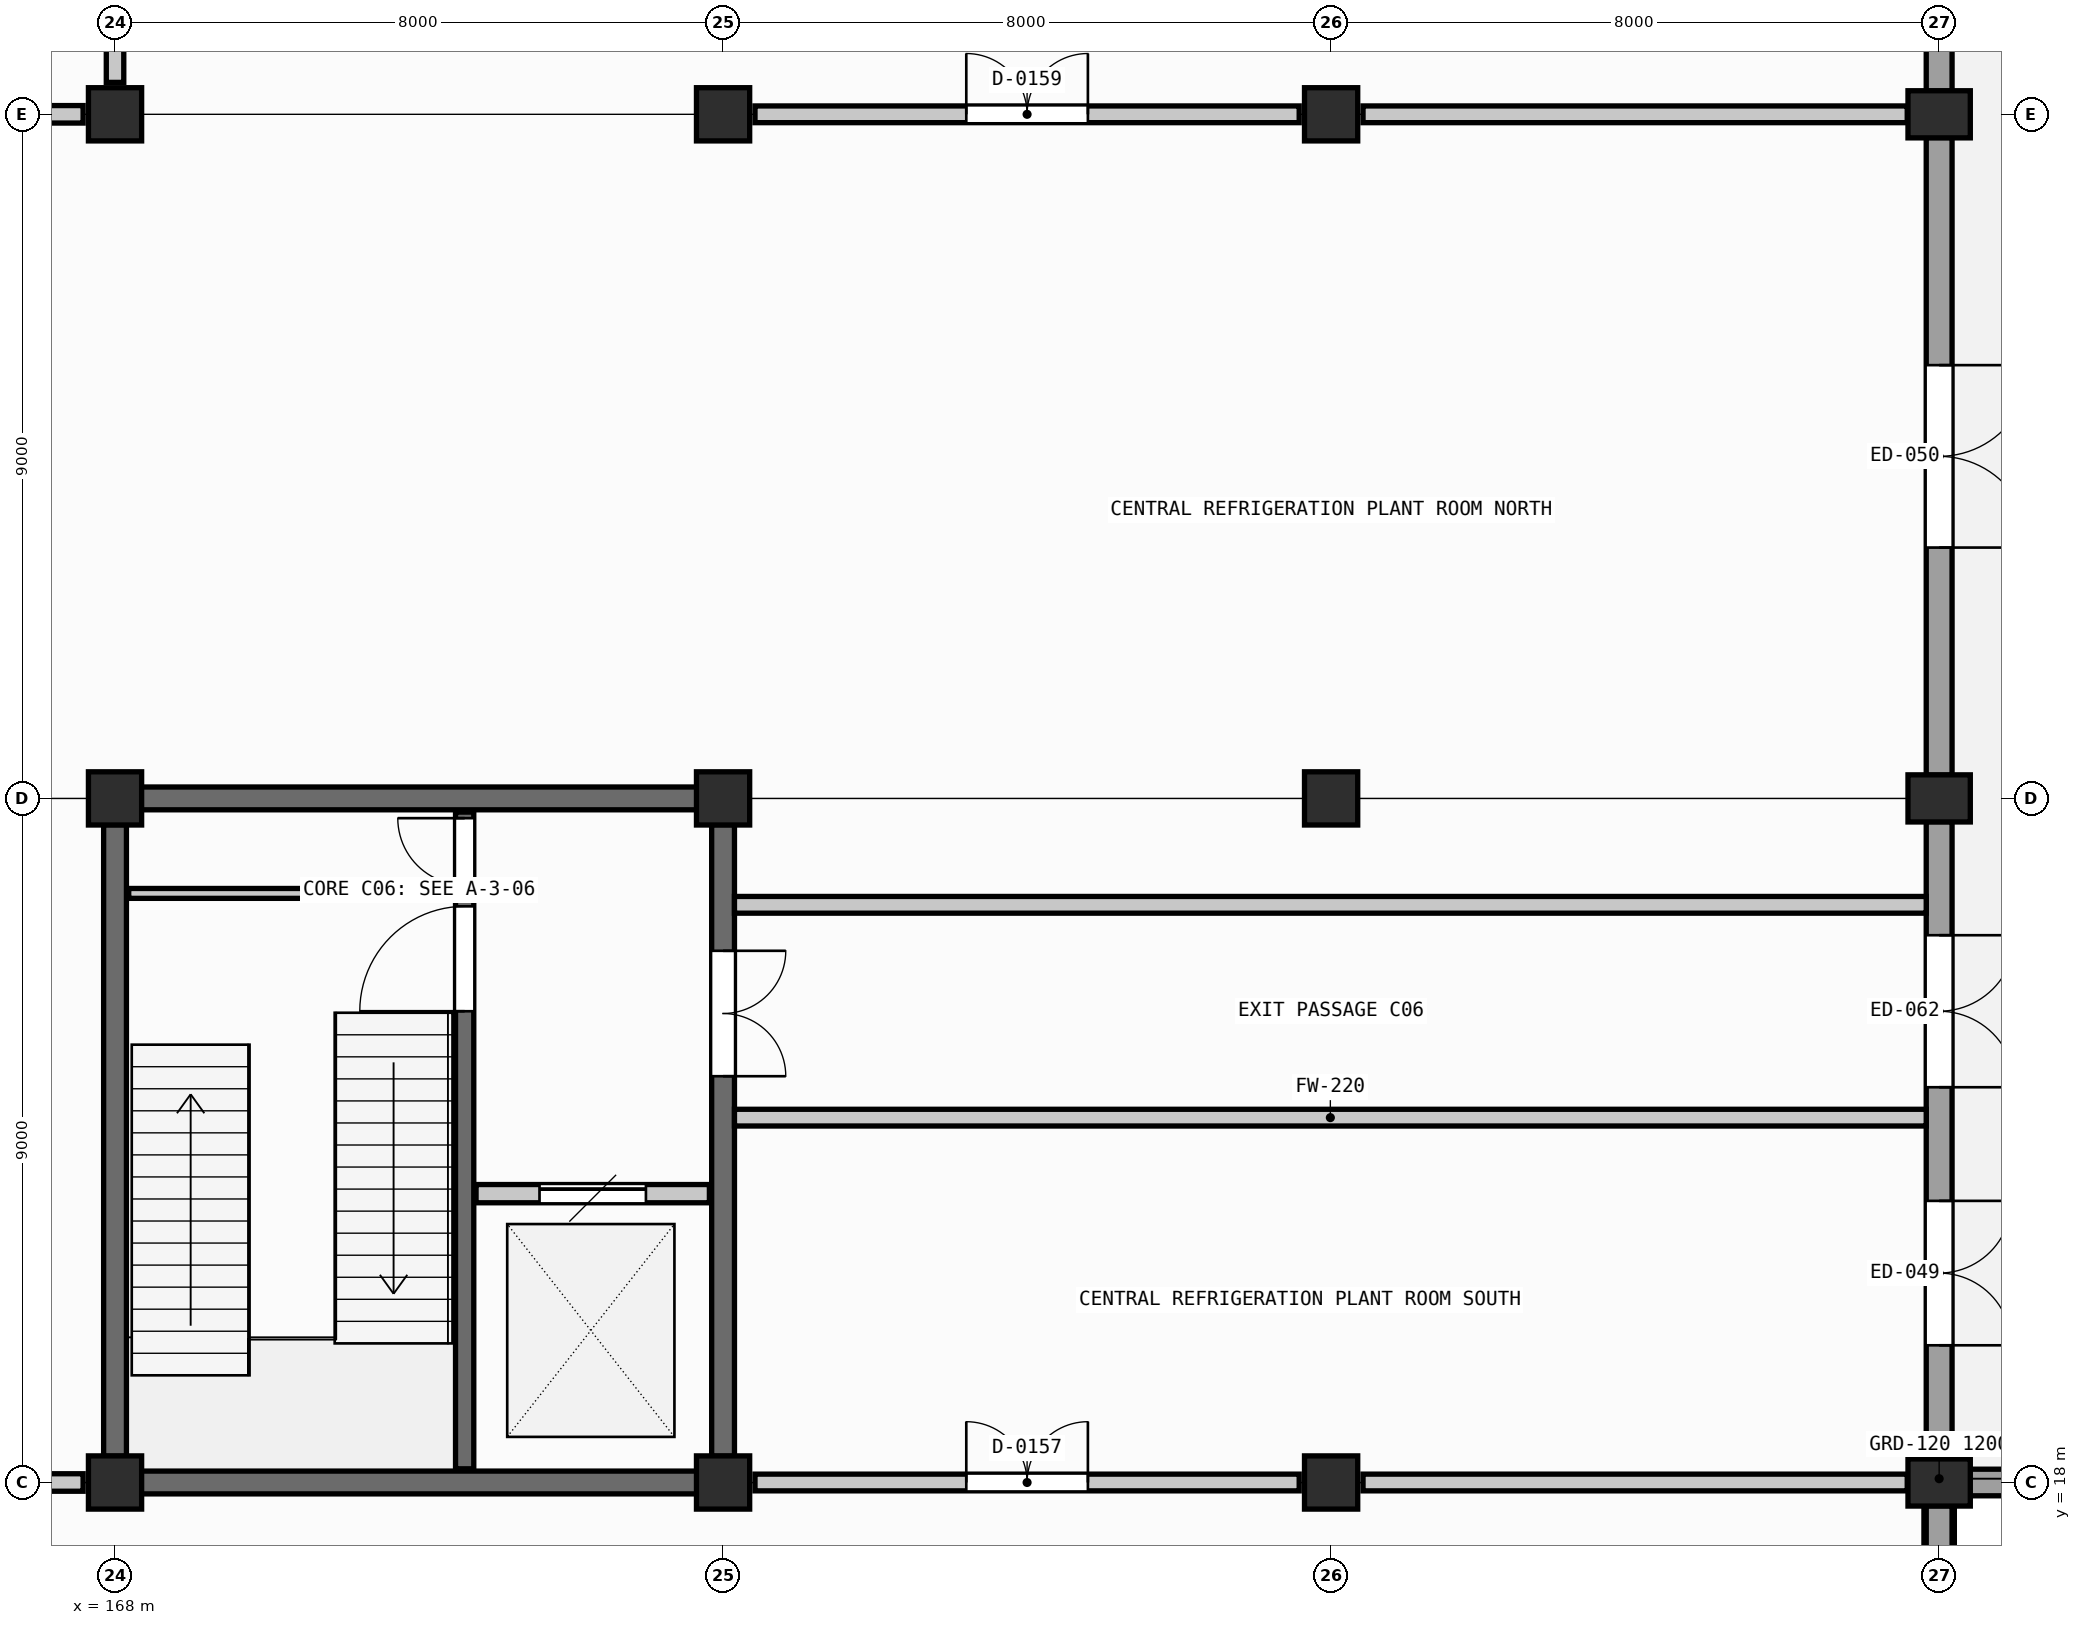
"""IFC4 building model, lengths in metres.
Left out: names, types, materials, properties, quantities, classifications, styles, units other than length and angle.
Written with IfcOpenShell. Run it as: python <this file> out.ifc"""

import sys

from ifc_helpers import new_model, si_unit, direction, frame, frame_2d, origin, origin_2d, place, context, subcontext, project, spatial, rectangle, extrude, element, fill, save


model = new_model("IFC4")
c1 = context("Model", 3, precision=1e-05, world=origin(), true_north=direction((0.0, 1.0)))
c2 = subcontext(c1, "Body", "Model", "MODEL_VIEW")
j1 = project(units=[si_unit("LENGTHUNIT", "METRE"), si_unit("PLANEANGLEUNIT", "RADIAN")], contexts=[c1])
p1 = place(None, origin())
s1 = spatial("IfcSite", under=j1, at=p1, CompositionType="ELEMENT")
p2 = place(p1, origin())
s2 = spatial("IfcBuilding", under=s1, at=p2, CompositionType="ELEMENT")
p3 = place(p2, origin())
s3 = spatial("IfcBuildingStorey", under=s2, at=p3, CompositionType="ELEMENT", Elevation=0.0)
p4 = place(p3, frame((192.0, 18.0, -1.25), z_axis=(0.0, 0.0, 1.0), x_axis=(1.0, 0.0, 0.0)))
e1 = element("IfcWall", 1, at=p4, inside=s3, PredefinedType="STANDARD", context=c2, shape_type="SweptSolid", body=[
    extrude(rectangle(XDim=3.2, YDim=0.35, at=frame_2d((1.6, 0.0))), origin(), (0.0, 0.0, 1.0), 0.97),
])
p5 = place(p3, frame((192.0, 0.0, -1.25), z_axis=(0.0, 0.0, 1.0), x_axis=(0.0, 1.0, 0.0)))
e2 = element("IfcWall", 2, at=p5, inside=s3, PredefinedType="STANDARD", context=c2, shape_type="SweptSolid", body=[
    extrude(rectangle(XDim=18.0, YDim=0.4, at=frame_2d((9.0, 0.0))), origin(), (0.0, 0.0, 1.0), 0.9),
])
for number, where, z_axis, x_axis in (
    (3, (168.0, 18.0, -1.25), (0.0, 0.0, 1.0), (1.0, 0.0, 0.0)),
    (4, (168.0, 27.0, -1.25), (0.0, 0.0, 1.0), (1.0, 0.0, 0.0)),
    (5, (168.0, 36.0, -1.25), (0.0, 0.0, 1.0), (1.0, 0.0, 0.0)),
    (6, (176.0, 18.0, -1.25), (0.0, 0.0, 1.0), (1.0, 0.0, 0.0)),
    (7, (176.0, 27.0, -1.25), (0.0, 0.0, 1.0), (1.0, 0.0, 0.0)),
    (8, (176.0, 36.0, -1.25), (0.0, 0.0, 1.0), (1.0, 0.0, 0.0)),
    (9, (184.0, 18.0, -1.25), (0.0, 0.0, 1.0), (1.0, 0.0, 0.0)),
    (10, (184.0, 27.0, -1.25), (0.0, 0.0, 1.0), (1.0, 0.0, 0.0)),
    (11, (184.0, 36.0, -1.25), (0.0, 0.0, 1.0), (1.0, 0.0, 0.0)),
):
    element("IfcColumn", number, at=place(p3, frame(where, z_axis=z_axis, x_axis=x_axis)), inside=s3, PredefinedType="COLUMN", context=c2, shape_type="SweptSolid", body=[
        extrude(rectangle(XDim=0.7, YDim=0.7, at=origin_2d()), origin(), (0.0, 0.0, 1.0), 6.05),
    ])
for number, where, z_axis, x_axis in (
    (12, (192.0, 18.0, -1.25), (0.0, 0.0, 1.0), (1.0, 0.0, 0.0)),
    (13, (192.0, 27.0, -1.25), (0.0, 0.0, 1.0), (1.0, 0.0, 0.0)),
    (14, (192.0, 36.0, -1.25), (0.0, 0.0, 1.0), (1.0, 0.0, 0.0)),
):
    element("IfcColumn", number, at=place(p3, frame(where, z_axis=z_axis, x_axis=x_axis)), inside=s3, PredefinedType="COLUMN", context=c2, shape_type="SweptSolid", body=[
        extrude(rectangle(XDim=0.82, YDim=0.62, at=origin_2d()), origin(), (0.0, 0.0, 1.0), 6.05),
    ])
p6 = place(p3, frame((192.0, 9.305, 0.0), z_axis=(0.0, 0.0, 1.0), x_axis=(0.0, 1.0, 0.0)))
e15 = element("IfcWall", 15, at=p6, inside=s3, PredefinedType="SOLIDWALL", context=c2, shape_type="SweptSolid", body=[
    extrude(rectangle(XDim=8.39, YDim=0.34, at=frame_2d((4.195, 0.0))), origin(), (0.0, 0.0, 1.0), 3.65),
])
p7 = place(p3, frame((192.0, 18.305, 0.0), z_axis=(0.0, 0.0, 1.0), x_axis=(0.0, 1.0, 0.0)))
e16 = element("IfcWall", 16, at=p7, inside=s3, PredefinedType="SOLIDWALL", context=c2, shape_type="SweptSolid", body=[
    extrude(rectangle(XDim=8.39, YDim=0.34, at=frame_2d((4.195, 0.0))), origin(), (0.0, 0.0, 1.0), 3.65),
])
p8 = place(p7, frame((1.5, 0.0, 0.0)))
e17 = element("IfcOpeningElement", 17, at=p8, cuts=e16, PredefinedType="OPENING", context=c2, shape_type="SweptSolid", body=[
    extrude(rectangle(XDim=1.9, YDim=2.3, at=frame_2d((0.95, 1.15))), frame((0.0, 0.18, 0.0), z_axis=(0.0, -1.0, 0.0), x_axis=(1.0, 0.0, 0.0)), (0.0, 0.0, 1.0), 0.36),
])
p9 = place(p7, frame((4.895, 0.0, 0.0)))
e18 = element("IfcOpeningElement", 18, at=p9, cuts=e16, PredefinedType="OPENING", context=c2, shape_type="SweptSolid", body=[
    extrude(rectangle(XDim=2.0, YDim=2.25, at=frame_2d((1.0, 1.125))), frame((0.0, 0.18, 0.0), z_axis=(0.0, -1.0, 0.0), x_axis=(1.0, 0.0, 0.0)), (0.0, 0.0, 1.0), 0.36),
])
p10 = place(p3, frame((192.0, 27.305, 0.0), z_axis=(0.0, 0.0, 1.0), x_axis=(0.0, 1.0, 0.0)))
e19 = element("IfcWall", 19, at=p10, inside=s3, PredefinedType="SOLIDWALL", context=c2, shape_type="SweptSolid", body=[
    extrude(rectangle(XDim=8.39, YDim=0.34, at=frame_2d((4.195, 0.0))), origin(), (0.0, 0.0, 1.0), 3.65),
])
p11 = place(p10, frame((2.995, 0.0, 0.0)))
e20 = element("IfcOpeningElement", 20, at=p11, cuts=e19, PredefinedType="OPENING", context=c2, shape_type="SweptSolid", body=[
    extrude(rectangle(XDim=2.4, YDim=2.3, at=frame_2d((1.2, 1.15))), frame((0.0, 0.18, 0.0), z_axis=(0.0, -1.0, 0.0), x_axis=(1.0, 0.0, 0.0)), (0.0, 0.0, 1.0), 0.36),
])
p12 = place(p3, frame((192.0, 36.305, 0.0), z_axis=(0.0, 0.0, 1.0), x_axis=(0.0, 1.0, 0.0)))
e21 = element("IfcWall", 21, at=p12, inside=s3, PredefinedType="SOLIDWALL", context=c2, shape_type="SweptSolid", body=[
    extrude(rectangle(XDim=8.39, YDim=0.34, at=frame_2d((4.195, 0.0))), origin(), (0.0, 0.0, 1.0), 3.65),
])
p13 = place(p12, frame((2.395, 0.0, 1.0)))
e22 = element("IfcOpeningElement", 22, at=p13, cuts=e21, PredefinedType="OPENING", context=c2, shape_type="SweptSolid", body=[
    extrude(rectangle(XDim=3.6, YDim=1.7, at=frame_2d((1.8, 0.85))), frame((0.0, 0.18, 0.0), z_axis=(0.0, -1.0, 0.0), x_axis=(1.0, 0.0, 0.0)), (0.0, 0.0, 1.0), 0.36),
])
for number, where, z_axis, x_axis in (
    (23, (168.345, 18.0, -1.25), (0.0, 0.0, 1.0), (1.0, 0.0, 0.0)),
    (24, (168.345, 27.0, -1.25), (0.0, 0.0, 1.0), (1.0, 0.0, 0.0)),
):
    element("IfcWall", number, at=place(p3, frame(where, z_axis=z_axis, x_axis=x_axis)), inside=s3, PredefinedType="SHEAR", context=c2, shape_type="SweptSolid", body=[
        extrude(rectangle(XDim=7.31, YDim=0.3, at=frame_2d((3.655, 0.0))), origin(), (0.0, 0.0, 1.0), 5.755),
    ])
p14 = place(p3, frame((168.0, 18.345, -1.25), z_axis=(0.0, 0.0, 1.0), x_axis=(0.0, 1.0, 0.0)))
e25 = element("IfcWall", 25, at=p14, inside=s3, PredefinedType="SHEAR", context=c2, shape_type="SweptSolid", body=[
    extrude(rectangle(XDim=8.31, YDim=0.3, at=frame_2d((4.155, 0.0))), origin(), (0.0, 0.0, 1.0), 5.755),
])
p15 = place(p3, frame((176.0, 18.345, -1.25), z_axis=(0.0, 0.0, 1.0), x_axis=(0.0, 1.0, 0.0)))
e26 = element("IfcWall", 26, at=p15, inside=s3, PredefinedType="SHEAR", context=c2, shape_type="SweptSolid", body=[
    extrude(rectangle(XDim=8.31, YDim=0.3, at=frame_2d((4.155, 0.0))), origin(), (0.0, 0.0, 1.0), 5.755),
])
p16 = place(p15, frame((5.0, 0.0, 1.25)))
e27 = element("IfcOpeningElement", 27, at=p16, cuts=e26, PredefinedType="OPENING", context=c2, shape_type="SweptSolid", body=[
    extrude(rectangle(XDim=1.65, YDim=2.22, at=frame_2d((0.825, 1.11))), frame((0.0, 0.16, 0.0), z_axis=(0.0, -1.0, 0.0), x_axis=(1.0, 0.0, 0.0)), (0.0, 0.0, 1.0), 0.32),
])
p17 = place(p3, frame((172.6, 18.18, -1.25), z_axis=(0.0, 0.0, 1.0), x_axis=(0.0, 1.0, 0.0)))
e28 = element("IfcWall", 28, at=p17, inside=s3, PredefinedType="SHEAR", context=c2, shape_type="SweptSolid", body=[
    extrude(rectangle(XDim=8.64, YDim=0.24, at=frame_2d((4.32, 0.0))), origin(), (0.0, 0.0, 1.0), 5.755),
])
p18 = place(p17, frame((6.02, 0.0, 1.25)))
e29 = element("IfcOpeningElement", 29, at=p18, cuts=e28, PredefinedType="OPENING", context=c2, shape_type="SweptSolid", body=[
    extrude(rectangle(XDim=1.38, YDim=2.22, at=frame_2d((0.69, 1.11))), frame((0.0, 0.13, 0.0), z_axis=(0.0, -1.0, 0.0), x_axis=(1.0, 0.0, 0.0)), (0.0, 0.0, 1.0), 0.26),
])
p19 = place(p17, frame((7.68, 0.0, 1.25)))
e30 = element("IfcOpeningElement", 30, at=p19, cuts=e28, PredefinedType="OPENING", context=c2, shape_type="SweptSolid", body=[
    extrude(rectangle(XDim=0.88, YDim=2.02, at=frame_2d((0.44, 1.01))), frame((0.0, 0.13, 0.0), z_axis=(0.0, -1.0, 0.0), x_axis=(1.0, 0.0, 0.0)), (0.0, 0.0, 1.0), 0.26),
])
p20 = place(p3, frame((168.18, 25.75, 0.0), z_axis=(0.0, 0.0, 1.0), x_axis=(1.0, 0.0, 0.0)))
e31 = element("IfcWall", 31, at=p20, inside=s3, PredefinedType="PARTITIONING", context=c2, shape_type="SweptSolid", body=[
    extrude(rectangle(XDim=4.28, YDim=0.13, at=frame_2d((2.14, 0.0))), origin(), (0.0, 0.0, 1.0), 3.855),
])
p21 = place(p3, frame((172.75, 21.8, 0.0), z_axis=(0.0, 0.0, 1.0), x_axis=(1.0, 0.0, 0.0)))
e32 = element("IfcWall", 32, at=p21, inside=s3, PredefinedType="SHEAR", context=c2, shape_type="SweptSolid", body=[
    extrude(rectangle(XDim=3.07, YDim=0.24, at=frame_2d((1.535, 0.0))), origin(), (0.0, 0.0, 1.0), 3.855),
])
p22 = place(p21, frame((0.835, 0.0, 0.0)))
e33 = element("IfcOpeningElement", 33, at=p22, cuts=e32, PredefinedType="OPENING", context=c2, shape_type="SweptSolid", body=[
    extrude(rectangle(XDim=1.4, YDim=2.3, at=frame_2d((0.7, 1.15))), frame((0.0, 0.13, 0.0), z_axis=(0.0, -1.0, 0.0), x_axis=(1.0, 0.0, 0.0)), (0.0, 0.0, 1.0), 0.26),
])
p23 = place(p3, frame((160.42, 18.0, 0.0), z_axis=(0.0, 0.0, 1.0), x_axis=(1.0, 0.0, 0.0)))
e34 = element("IfcWall", 34, at=p23, inside=s3, PredefinedType="PARTITIONING", context=c2, shape_type="SweptSolid", body=[
    extrude(rectangle(XDim=7.16, YDim=0.23, at=frame_2d((3.58, 0.0))), origin(), (0.0, 0.0, 1.0), 3.55),
])
p24 = place(p3, frame((176.42, 18.0, 0.0), z_axis=(0.0, 0.0, 1.0), x_axis=(1.0, 0.0, 0.0)))
e35 = element("IfcWall", 35, at=p24, inside=s3, PredefinedType="SOLIDWALL", context=c2, shape_type="SweptSolid", body=[
    extrude(rectangle(XDim=7.16, YDim=0.22, at=frame_2d((3.58, 0.0))), origin(), (0.0, 0.0, 1.0), 3.55),
])
p25 = place(p24, frame((2.78, 0.0, 0.0)))
e36 = element("IfcOpeningElement", 36, at=p25, cuts=e35, PredefinedType="OPENING", context=c2, shape_type="SweptSolid", body=[
    extrude(rectangle(XDim=1.6, YDim=2.28, at=frame_2d((0.8, 1.14))), frame((0.0, 0.12, 0.0), z_axis=(0.0, -1.0, 0.0), x_axis=(1.0, 0.0, 0.0)), (0.0, 0.0, 1.0), 0.24),
])
p26 = place(p3, frame((184.42, 18.0, 0.0), z_axis=(0.0, 0.0, 1.0), x_axis=(1.0, 0.0, 0.0)))
e37 = element("IfcWall", 37, at=p26, inside=s3, PredefinedType="SOLIDWALL", context=c2, shape_type="SweptSolid", body=[
    extrude(rectangle(XDim=7.16, YDim=0.22, at=frame_2d((3.58, 0.0))), origin(), (0.0, 0.0, 1.0), 3.55),
])
p27 = place(p3, frame((160.42, 36.0, 0.0), z_axis=(0.0, 0.0, 1.0), x_axis=(1.0, 0.0, 0.0)))
e38 = element("IfcWall", 38, at=p27, inside=s3, PredefinedType="PARTITIONING", context=c2, shape_type="SweptSolid", body=[
    extrude(rectangle(XDim=7.16, YDim=0.23, at=frame_2d((3.58, 0.0))), origin(), (0.0, 0.0, 1.0), 3.55),
])
p28 = place(p3, frame((176.42, 36.0, 0.0), z_axis=(0.0, 0.0, 1.0), x_axis=(1.0, 0.0, 0.0)))
e39 = element("IfcWall", 39, at=p28, inside=s3, PredefinedType="SOLIDWALL", context=c2, shape_type="SweptSolid", body=[
    extrude(rectangle(XDim=7.16, YDim=0.22, at=frame_2d((3.58, 0.0))), origin(), (0.0, 0.0, 1.0), 3.55),
])
p29 = place(p28, frame((2.78, 0.0, 0.0)))
e40 = element("IfcOpeningElement", 40, at=p29, cuts=e39, PredefinedType="OPENING", context=c2, shape_type="SweptSolid", body=[
    extrude(rectangle(XDim=1.6, YDim=2.28, at=frame_2d((0.8, 1.14))), frame((0.0, 0.12, 0.0), z_axis=(0.0, -1.0, 0.0), x_axis=(1.0, 0.0, 0.0)), (0.0, 0.0, 1.0), 0.24),
])
p30 = place(p3, frame((184.42, 36.0, 0.0), z_axis=(0.0, 0.0, 1.0), x_axis=(1.0, 0.0, 0.0)))
e41 = element("IfcWall", 41, at=p30, inside=s3, PredefinedType="SOLIDWALL", context=c2, shape_type="SweptSolid", body=[
    extrude(rectangle(XDim=7.16, YDim=0.22, at=frame_2d((3.58, 0.0))), origin(), (0.0, 0.0, 1.0), 3.55),
])
p31 = place(p3, frame((168.0, 36.42, 0.0), z_axis=(0.0, 0.0, 1.0), x_axis=(0.0, 1.0, 0.0)))
e42 = element("IfcWall", 42, at=p31, inside=s3, PredefinedType="PARTITIONING", context=c2, shape_type="SweptSolid", body=[
    extrude(rectangle(XDim=8.16, YDim=0.23, at=frame_2d((4.08, 0.0))), origin(), (0.0, 0.0, 1.0), 3.65),
])
p32 = place(p31, frame((3.08, 0.0, 0.0)))
e43 = element("IfcOpeningElement", 43, at=p32, cuts=e42, PredefinedType="OPENING", context=c2, shape_type="SweptSolid", body=[
    extrude(rectangle(XDim=2.0, YDim=2.5, at=frame_2d((1.0, 1.25))), frame((0.0, 0.125, 0.0), z_axis=(0.0, -1.0, 0.0), x_axis=(1.0, 0.0, 0.0)), (0.0, 0.0, 1.0), 0.25),
])
for number, where, z_axis, x_axis in (
    (44, (176.15, 22.8, 0.0), (0.0, 0.0, 1.0), (1.0, 0.0, 0.0)),
    (45, (176.15, 25.6, 0.0), (0.0, 0.0, 1.0), (1.0, 0.0, 0.0)),
):
    element("IfcWall", number, at=place(p3, frame(where, z_axis=z_axis, x_axis=x_axis)), inside=s3, PredefinedType="SOLIDWALL", context=c2, shape_type="SweptSolid", body=[
        extrude(rectangle(XDim=15.68, YDim=0.22, at=frame_2d((7.84, 0.0))), origin(), (0.0, 0.0, 1.0), 3.65),
    ])
p33 = place(p8, frame((1.9, 0.0, 0.0), z_axis=(0.0, 0.0, 1.0), x_axis=(-1.0, 0.0, 0.0)))
e46 = element("IfcDoor", 46, at=p33, inside=s3, OperationType="DOUBLE_DOOR_SINGLE_SWING", PredefinedType="DOOR", context=c2, shape_type="SweptSolid", body=[
    extrude(rectangle(XDim=1.9, YDim=2.3, at=frame_2d((0.95, 1.15))), frame((0.0, 0.025, 0.0), z_axis=(0.0, -1.0, 0.0), x_axis=(1.0, 0.0, 0.0)), (0.0, 0.0, 1.0), 0.05),
])
fill(e17, e46)
p34 = place(p11, frame((2.4, 0.0, 0.0), z_axis=(0.0, 0.0, 1.0), x_axis=(-1.0, 0.0, 0.0)))
e47 = element("IfcDoor", 47, at=p34, inside=s3, OperationType="DOUBLE_DOOR_SINGLE_SWING", PredefinedType="DOOR", context=c2, shape_type="SweptSolid", body=[
    extrude(rectangle(XDim=2.4, YDim=2.3, at=frame_2d((1.2, 1.15))), frame((0.0, 0.025, 0.0), z_axis=(0.0, -1.0, 0.0), x_axis=(1.0, 0.0, 0.0)), (0.0, 0.0, 1.0), 0.05),
])
fill(e20, e47)
p35 = place(p18, origin())
e48 = element("IfcDoor", 48, at=p35, inside=s3, OperationType="SINGLE_SWING_LEFT", PredefinedType="DOOR", context=c2, shape_type="SweptSolid", body=[
    extrude(rectangle(XDim=1.38, YDim=2.22, at=frame_2d((0.69, 1.11))), frame((0.0, 0.025, 0.0), z_axis=(0.0, -1.0, 0.0), x_axis=(1.0, 0.0, 0.0)), (0.0, 0.0, 1.0), 0.05),
])
fill(e29, e48)
p36 = place(p19, origin())
e49 = element("IfcDoor", 49, at=p36, inside=s3, OperationType="SINGLE_SWING_RIGHT", PredefinedType="DOOR", context=c2, shape_type="SweptSolid", body=[
    extrude(rectangle(XDim=0.88, YDim=2.02, at=frame_2d((0.44, 1.01))), frame((0.0, 0.025, 0.0), z_axis=(0.0, -1.0, 0.0), x_axis=(1.0, 0.0, 0.0)), (0.0, 0.0, 1.0), 0.05),
])
fill(e30, e49)
p37 = place(p16, frame((1.65, 0.0, 0.0), z_axis=(0.0, 0.0, 1.0), x_axis=(-1.0, 0.0, 0.0)))
e50 = element("IfcDoor", 50, at=p37, inside=s3, OperationType="DOUBLE_DOOR_SINGLE_SWING", PredefinedType="DOOR", context=c2, shape_type="SweptSolid", body=[
    extrude(rectangle(XDim=1.65, YDim=2.22, at=frame_2d((0.825, 1.11))), frame((0.0, 0.025, 0.0), z_axis=(0.0, -1.0, 0.0), x_axis=(1.0, 0.0, 0.0)), (0.0, 0.0, 1.0), 0.05),
])
fill(e27, e50)
p38 = place(p22, origin())
e51 = element("IfcDoor", 51, at=p38, inside=s3, OperationType="SLIDING_TO_LEFT", PredefinedType="DOOR", context=c2, shape_type="SweptSolid", body=[
    extrude(rectangle(XDim=1.4, YDim=2.3, at=frame_2d((0.7, 1.15))), frame((0.0, 0.025, 0.0), z_axis=(0.0, -1.0, 0.0), x_axis=(1.0, 0.0, 0.0)), (0.0, 0.0, 1.0), 0.05),
])
fill(e33, e51)
p39 = place(p25, origin())
e52 = element("IfcDoor", 52, at=p39, inside=s3, OperationType="DOUBLE_DOOR_SINGLE_SWING", PredefinedType="DOOR", context=c2, shape_type="SweptSolid", body=[
    extrude(rectangle(XDim=1.6, YDim=2.28, at=frame_2d((0.8, 1.14))), frame((0.0, 0.025, 0.0), z_axis=(0.0, -1.0, 0.0), x_axis=(1.0, 0.0, 0.0)), (0.0, 0.0, 1.0), 0.05),
])
fill(e36, e52)
p40 = place(p29, origin())
e53 = element("IfcDoor", 53, at=p40, inside=s3, OperationType="DOUBLE_DOOR_SINGLE_SWING", PredefinedType="DOOR", context=c2, shape_type="SweptSolid", body=[
    extrude(rectangle(XDim=1.6, YDim=2.28, at=frame_2d((0.8, 1.14))), frame((0.0, 0.025, 0.0), z_axis=(0.0, -1.0, 0.0), x_axis=(1.0, 0.0, 0.0)), (0.0, 0.0, 1.0), 0.05),
])
fill(e40, e53)
p41 = place(p9, frame((2.0, 0.0, 0.0), z_axis=(0.0, 0.0, 1.0), x_axis=(-1.0, 0.0, 0.0)))
e54 = element("IfcDoor", 54, at=p41, inside=s3, OperationType="DOUBLE_DOOR_SINGLE_SWING", PredefinedType="DOOR", context=c2, shape_type="SweptSolid", body=[
    extrude(rectangle(XDim=2.0, YDim=2.25, at=frame_2d((1.0, 1.125))), frame((0.0, 0.025, 0.0), z_axis=(0.0, -1.0, 0.0), x_axis=(1.0, 0.0, 0.0)), (0.0, 0.0, 1.0), 0.05),
])
fill(e18, e54)
save(model, sys.argv[1])
